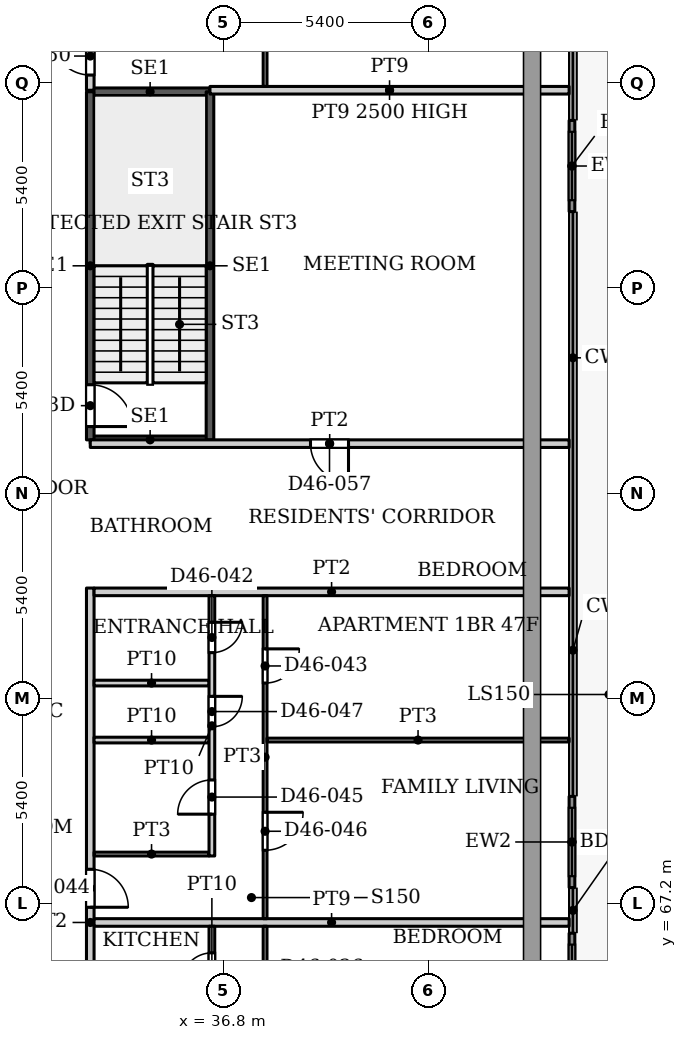
"""IFC4 building model, lengths in metres.
Left out: names, types, materials, properties, quantities, classifications, styles, units other than length and angle.
Written with IfcOpenShell. Run it as: python <this file> out.ifc"""

import sys

from ifc_helpers import new_model, si_unit, direction, frame, frame_2d, origin, place, context, subcontext, project, spatial, rectangle, extrude, source, transform, mapped, element, fill, save


model = new_model("IFC4")
c1 = context("Model", 3, precision=1e-05, world=origin(), true_north=direction((0.0, 1.0)))
c2 = subcontext(c1, "Body", "Model", "MODEL_VIEW")
j1 = project(units=[si_unit("LENGTHUNIT", "METRE"), si_unit("PLANEANGLEUNIT", "RADIAN")], contexts=[c1])
p1 = place(None, origin())
s1 = spatial("IfcSite", under=j1, at=p1, CompositionType="ELEMENT")
p2 = place(p1, origin())
s2 = spatial("IfcBuilding", under=s1, at=p2, CompositionType="ELEMENT")
p3 = place(p2, frame((0.0, 0.0, 199.4)))
s3 = spatial("IfcBuildingStorey", under=s2, at=p3, CompositionType="ELEMENT", Elevation=199.4)
p4 = place(p3, frame((45.975, 87.806, 0.0), z_axis=(0.0, 0.0, 1.0), x_axis=(0.0, -1.0, 0.0)))
e1 = element("IfcWall", 1, at=p4, inside=s3, PredefinedType="SOLIDWALL", context=c2, shape_type="SweptSolid", body=[
    extrude(rectangle(XDim=2.4, YDim=0.15, at=frame_2d((1.2, 0.0))), origin(), (0.0, 0.0, 1.0), 3.75),
])
p5 = place(p4, frame((0.3, 0.0, 0.0)))
e2 = element("IfcOpeningElement", 2, at=p5, cuts=e1, PredefinedType="OPENING", context=c2, shape_type="SweptSolid", body=[
    extrude(rectangle(XDim=1.8, YDim=2.4, at=frame_2d((0.9, 1.2))), frame((0.0, 0.085, 0.0), z_axis=(0.0, -1.0, 0.0), x_axis=(1.0, 0.0, 0.0)), (0.0, 0.0, 1.0), 0.17),
])
p6 = place(p3, frame((45.975, 70.018, 0.0), z_axis=(0.0, 0.0, 1.0), x_axis=(0.0, -1.0, 0.0)))
e3 = element("IfcWall", 3, at=p6, inside=s3, PredefinedType="SOLIDWALL", context=c2, shape_type="SweptSolid", body=[
    extrude(rectangle(XDim=2.4, YDim=0.15, at=frame_2d((1.2, 0.0))), origin(), (0.0, 0.0, 1.0), 3.75),
])
p7 = place(p6, frame((0.3, 0.0, 0.0)))
e4 = element("IfcOpeningElement", 4, at=p7, cuts=e3, PredefinedType="OPENING", context=c2, shape_type="SweptSolid", body=[
    extrude(rectangle(XDim=1.8, YDim=2.4, at=frame_2d((0.9, 1.2))), frame((0.0, 0.085, 0.0), z_axis=(0.0, -1.0, 0.0), x_axis=(1.0, 0.0, 0.0)), (0.0, 0.0, 1.0), 0.17),
])
p8 = place(p3, frame((45.975, 66.418, 0.0), z_axis=(0.0, 0.0, 1.0), x_axis=(0.0, -1.0, 0.0)))
e5 = element("IfcWall", 5, at=p8, inside=s3, PredefinedType="SOLIDWALL", context=c2, shape_type="SweptSolid", body=[
    extrude(rectangle(XDim=2.4, YDim=0.15, at=frame_2d((1.2, 0.0))), origin(), (0.0, 0.0, 1.0), 3.75),
])
p9 = place(p8, frame((0.3, 0.0, 0.0)))
e6 = element("IfcOpeningElement", 6, at=p9, cuts=e5, PredefinedType="OPENING", context=c2, shape_type="SweptSolid", body=[
    extrude(rectangle(XDim=1.8, YDim=2.4, at=frame_2d((0.9, 1.2))), frame((0.0, 0.085, 0.0), z_axis=(0.0, -1.0, 0.0), x_axis=(1.0, 0.0, 0.0)), (0.0, 0.0, 1.0), 0.17),
])
for number, where, z_axis, x_axis in (
    (7, (33.3, 79.4, 0.0), (0.0, 0.0, 1.0), (1.0, 0.0, 0.0)),
    (8, (33.3, 88.56, 0.0), (0.0, 0.0, 1.0), (1.0, 0.0, 0.0)),
):
    element("IfcWall", number, at=place(p3, frame(where, z_axis=z_axis, x_axis=x_axis)), inside=s3, PredefinedType="SHEAR", context=c2, shape_type="SweptSolid", body=[
        extrude(rectangle(XDim=3.15, YDim=0.2, at=frame_2d((1.575, 0.0))), origin(), (0.0, 0.0, 1.0), 3.9),
    ])
p10 = place(p3, frame((33.3, 79.4, 0.0), z_axis=(0.0, 0.0, 1.0), x_axis=(0.0, 1.0, 0.0)))
e9 = element("IfcWall", 9, at=p10, inside=s3, PredefinedType="SHEAR", context=c2, shape_type="SweptSolid", body=[
    extrude(rectangle(XDim=9.16, YDim=0.2, at=frame_2d((4.58, 0.0))), origin(), (0.0, 0.0, 1.0), 3.9),
])
p11 = place(p10, frame((0.35, 0.0, 0.0)))
e10 = element("IfcOpeningElement", 10, at=p11, cuts=e9, PredefinedType="OPENING", context=c2, shape_type="SweptSolid", body=[
    extrude(rectangle(XDim=1.1, YDim=2.2, at=frame_2d((0.55, 1.1))), frame((0.0, 0.11, 0.0), z_axis=(0.0, -1.0, 0.0), x_axis=(1.0, 0.0, 0.0)), (0.0, 0.0, 1.0), 0.22),
])
p12 = place(p3, frame((36.45, 79.4, 0.0), z_axis=(0.0, 0.0, 1.0), x_axis=(0.0, 1.0, 0.0)))
e11 = element("IfcWall", 11, at=p12, inside=s3, PredefinedType="SHEAR", context=c2, shape_type="SweptSolid", body=[
    extrude(rectangle(XDim=9.16, YDim=0.2, at=frame_2d((4.58, 0.0))), origin(), (0.0, 0.0, 1.0), 3.9),
])
p13 = place(p3, frame((33.3, 57.9, 0.0), z_axis=(0.0, 0.0, 1.0), x_axis=(0.0, 1.0, 0.0)))
e12 = element("IfcWall", 12, at=p13, inside=s3, PredefinedType="PARTITIONING", context=c2, shape_type="SweptSolid", body=[
    extrude(rectangle(XDim=17.6, YDim=0.2, at=frame_2d((8.8, 0.0))), origin(), (0.0, 0.0, 1.0), 3.6),
])
p14 = place(p13, frame((5.0, 0.0, 0.0)))
e13 = element("IfcOpeningElement", 13, at=p14, cuts=e12, PredefinedType="OPENING", context=c2, shape_type="SweptSolid", body=[
    extrude(rectangle(XDim=1.0, YDim=2.1, at=frame_2d((0.5, 1.05))), frame((0.0, 0.11, 0.0), z_axis=(0.0, -1.0, 0.0), x_axis=(1.0, 0.0, 0.0)), (0.0, 0.0, 1.0), 0.22),
])
p15 = place(p13, frame((9.2, 0.0, 0.0)))
e14 = element("IfcOpeningElement", 14, at=p15, cuts=e12, PredefinedType="OPENING", context=c2, shape_type="SweptSolid", body=[
    extrude(rectangle(XDim=1.0, YDim=2.1, at=frame_2d((0.5, 1.05))), frame((0.0, 0.11, 0.0), z_axis=(0.0, -1.0, 0.0), x_axis=(1.0, 0.0, 0.0)), (0.0, 0.0, 1.0), 0.22),
])
p16 = place(p3, frame((33.3, 79.3, 0.0), z_axis=(0.0, 0.0, 1.0), x_axis=(1.0, 0.0, 0.0)))
e15 = element("IfcWall", 15, at=p16, inside=s3, PredefinedType="PARTITIONING", context=c2, shape_type="SweptSolid", body=[
    extrude(rectangle(XDim=12.6, YDim=0.2, at=frame_2d((6.3, 0.0))), origin(), (0.0, 0.0, 1.0), 3.6),
])
p17 = place(p16, frame((5.795, 0.0, 0.0)))
e16 = element("IfcOpeningElement", 16, at=p17, cuts=e15, PredefinedType="OPENING", context=c2, shape_type="SweptSolid", body=[
    extrude(rectangle(XDim=1.0, YDim=2.1, at=frame_2d((0.5, 1.05))), frame((0.0, 0.11, 0.0), z_axis=(0.0, -1.0, 0.0), x_axis=(1.0, 0.0, 0.0)), (0.0, 0.0, 1.0), 0.22),
])
p18 = place(p3, frame((33.3, 88.6, 0.0), z_axis=(0.0, 0.0, 1.0), x_axis=(0.0, 1.0, 0.0)))
e17 = element("IfcWall", 17, at=p18, inside=s3, PredefinedType="PARTITIONING", context=c2, shape_type="SweptSolid", body=[
    extrude(rectangle(XDim=5.5, YDim=0.2, at=frame_2d((2.75, 0.0))), origin(), (0.0, 0.0, 1.0), 3.6),
])
p19 = place(p18, frame((0.4, 0.0, 0.0)))
e18 = element("IfcOpeningElement", 18, at=p19, cuts=e17, PredefinedType="OPENING", context=c2, shape_type="SweptSolid", body=[
    extrude(rectangle(XDim=1.0, YDim=2.1, at=frame_2d((0.5, 1.05))), frame((0.0, 0.11, 0.0), z_axis=(0.0, -1.0, 0.0), x_axis=(1.0, 0.0, 0.0)), (0.0, 0.0, 1.0), 0.22),
])
p20 = place(p3, frame((33.4, 66.7, 0.0), z_axis=(0.0, 0.0, 1.0), x_axis=(1.0, 0.0, 0.0)))
e19 = element("IfcWall", 19, at=p20, inside=s3, PredefinedType="PARTITIONING", context=c2, shape_type="SweptSolid", body=[
    extrude(rectangle(XDim=12.5, YDim=0.2, at=frame_2d((6.25, 0.0))), origin(), (0.0, 0.0, 1.0), 3.6),
])
p21 = place(p3, frame((33.4, 68.5, 0.0), z_axis=(0.0, 0.0, 1.0), x_axis=(1.0, 0.0, 0.0)))
e20 = element("IfcWall", 20, at=p21, inside=s3, PredefinedType="PARTITIONING", context=c2, shape_type="SweptSolid", body=[
    extrude(rectangle(XDim=3.025, YDim=0.1, at=frame_2d((1.513, 0.0))), origin(), (0.0, 0.0, 1.0), 3.6),
])
for number, where, z_axis, x_axis in (
    (21, (33.4, 71.5, 0.0), (0.0, 0.0, 1.0), (1.0, 0.0, 0.0)),
    (22, (33.4, 73.0, 0.0), (0.0, 0.0, 1.0), (1.0, 0.0, 0.0)),
):
    element("IfcWall", number, at=place(p3, frame(where, z_axis=z_axis, x_axis=x_axis)), inside=s3, PredefinedType="PARTITIONING", context=c2, shape_type="SweptSolid", body=[
        extrude(rectangle(XDim=3.025, YDim=0.15, at=frame_2d((1.513, 0.0))), origin(), (0.0, 0.0, 1.0), 3.6),
    ])
p22 = place(p3, frame((33.4, 75.4, 0.0), z_axis=(0.0, 0.0, 1.0), x_axis=(1.0, 0.0, 0.0)))
e23 = element("IfcWall", 23, at=p22, inside=s3, PredefinedType="PARTITIONING", context=c2, shape_type="SweptSolid", body=[
    extrude(rectangle(XDim=12.5, YDim=0.2, at=frame_2d((6.25, 0.0))), origin(), (0.0, 0.0, 1.0), 3.6),
])
p23 = place(p3, frame((36.5, 64.375, 0.0), z_axis=(0.0, 0.0, 1.0), x_axis=(0.0, 1.0, 0.0)))
e24 = element("IfcWall", 24, at=p23, inside=s3, PredefinedType="PARTITIONING", context=c2, shape_type="SweptSolid", body=[
    extrude(rectangle(XDim=2.225, YDim=0.15, at=frame_2d((1.113, 0.0))), origin(), (0.0, 0.0, 1.0), 3.6),
])
p24 = place(p23, frame((0.725, 0.0, 0.0)))
e25 = element("IfcOpeningElement", 25, at=p24, cuts=e24, PredefinedType="OPENING", context=c2, shape_type="SweptSolid", body=[
    extrude(rectangle(XDim=0.8, YDim=2.1, at=frame_2d((0.4, 1.05))), frame((0.0, 0.085, 0.0), z_axis=(0.0, -1.0, 0.0), x_axis=(1.0, 0.0, 0.0)), (0.0, 0.0, 1.0), 0.17),
])
p25 = place(p3, frame((36.5, 68.45, 0.0), z_axis=(0.0, 0.0, 1.0), x_axis=(0.0, 1.0, 0.0)))
e26 = element("IfcWall", 26, at=p25, inside=s3, PredefinedType="PARTITIONING", context=c2, shape_type="SweptSolid", body=[
    extrude(rectangle(XDim=6.85, YDim=0.15, at=frame_2d((3.425, 0.0))), origin(), (0.0, 0.0, 1.0), 3.6),
])
p26 = place(p25, frame((5.35, 0.0, 0.0)))
e27 = element("IfcOpeningElement", 27, at=p26, cuts=e26, PredefinedType="OPENING", context=c2, shape_type="SweptSolid", body=[
    extrude(rectangle(XDim=0.8, YDim=2.1, at=frame_2d((0.4, 1.05))), frame((0.0, 0.085, 0.0), z_axis=(0.0, -1.0, 0.0), x_axis=(1.0, 0.0, 0.0)), (0.0, 0.0, 1.0), 0.17),
])
p27 = place(p25, frame((1.1, 0.0, 0.0)))
e28 = element("IfcOpeningElement", 28, at=p27, cuts=e26, PredefinedType="OPENING", context=c2, shape_type="SweptSolid", body=[
    extrude(rectangle(XDim=0.9, YDim=2.1, at=frame_2d((0.45, 1.05))), frame((0.0, 0.085, 0.0), z_axis=(0.0, -1.0, 0.0), x_axis=(1.0, 0.0, 0.0)), (0.0, 0.0, 1.0), 0.17),
])
p28 = place(p25, frame((3.4, 0.0, 0.0)))
e29 = element("IfcOpeningElement", 29, at=p28, cuts=e26, PredefinedType="OPENING", context=c2, shape_type="SweptSolid", body=[
    extrude(rectangle(XDim=0.8, YDim=2.1, at=frame_2d((0.4, 1.05))), frame((0.0, 0.085, 0.0), z_axis=(0.0, -1.0, 0.0), x_axis=(1.0, 0.0, 0.0)), (0.0, 0.0, 1.0), 0.17),
])
p29 = place(p3, frame((36.45, 88.6, 0.0), z_axis=(0.0, 0.0, 1.0), x_axis=(1.0, 0.0, 0.0)))
e30 = element("IfcWall", 30, at=p29, inside=s3, PredefinedType="PARTITIONING", context=c2, shape_type="SweptSolid", body=[
    extrude(rectangle(XDim=9.45, YDim=0.2, at=frame_2d((4.725, 0.0))), origin(), (0.0, 0.0, 1.0), 2.5),
])
p30 = place(p3, frame((37.9, 58.1, 0.0), z_axis=(0.0, 0.0, 1.0), x_axis=(0.0, 1.0, 0.0)))
e31 = element("IfcWall", 31, at=p30, inside=s3, PredefinedType="PARTITIONING", context=c2, shape_type="SweptSolid", body=[
    extrude(rectangle(XDim=8.5, YDim=0.1, at=frame_2d((4.25, 0.0))), origin(), (0.0, 0.0, 1.0), 3.6),
])
p31 = place(p30, frame((6.35, 0.0, 0.0)))
e32 = element("IfcOpeningElement", 32, at=p31, cuts=e31, PredefinedType="OPENING", context=c2, shape_type="SweptSolid", body=[
    extrude(rectangle(XDim=0.9, YDim=2.1, at=frame_2d((0.45, 1.05))), frame((0.0, 0.06, 0.0), z_axis=(0.0, -1.0, 0.0), x_axis=(1.0, 0.0, 0.0)), (0.0, 0.0, 1.0), 0.12),
])
p32 = place(p30, frame((1.95, 0.0, 0.0)))
e33 = element("IfcOpeningElement", 33, at=p32, cuts=e31, PredefinedType="OPENING", context=c2, shape_type="SweptSolid", body=[
    extrude(rectangle(XDim=1.0, YDim=2.1, at=frame_2d((0.5, 1.05))), frame((0.0, 0.06, 0.0), z_axis=(0.0, -1.0, 0.0), x_axis=(1.0, 0.0, 0.0)), (0.0, 0.0, 1.0), 0.12),
])
p33 = place(p3, frame((37.9, 66.8, 0.0), z_axis=(0.0, 0.0, 1.0), x_axis=(0.0, 1.0, 0.0)))
e34 = element("IfcWall", 34, at=p33, inside=s3, PredefinedType="PARTITIONING", context=c2, shape_type="SweptSolid", body=[
    extrude(rectangle(XDim=8.5, YDim=0.1, at=frame_2d((4.25, 0.0))), origin(), (0.0, 0.0, 1.0), 3.6),
])
p34 = place(p33, frame((6.2, 0.0, 0.0)))
e35 = element("IfcOpeningElement", 35, at=p34, cuts=e34, PredefinedType="OPENING", context=c2, shape_type="SweptSolid", body=[
    extrude(rectangle(XDim=0.9, YDim=2.1, at=frame_2d((0.45, 1.05))), frame((0.0, 0.06, 0.0), z_axis=(0.0, -1.0, 0.0), x_axis=(1.0, 0.0, 0.0)), (0.0, 0.0, 1.0), 0.12),
])
p35 = place(p33, frame((1.8, 0.0, 0.0)))
e36 = element("IfcOpeningElement", 36, at=p35, cuts=e34, PredefinedType="OPENING", context=c2, shape_type="SweptSolid", body=[
    extrude(rectangle(XDim=1.0, YDim=2.1, at=frame_2d((0.5, 1.05))), frame((0.0, 0.06, 0.0), z_axis=(0.0, -1.0, 0.0), x_axis=(1.0, 0.0, 0.0)), (0.0, 0.0, 1.0), 0.12),
])
p36 = place(p3, frame((37.9, 88.7, 0.0), z_axis=(0.0, 0.0, 1.0), x_axis=(0.0, 1.0, 0.0)))
e37 = element("IfcWall", 37, at=p36, inside=s3, PredefinedType="PARTITIONING", context=c2, shape_type="SweptSolid", body=[
    extrude(rectangle(XDim=9.2, YDim=0.1, at=frame_2d((4.6, 0.0))), origin(), (0.0, 0.0, 1.0), 3.6),
])
p37 = place(p36, frame((6.95, 0.0, 0.0)))
e38 = element("IfcOpeningElement", 38, at=p37, cuts=e37, PredefinedType="OPENING", context=c2, shape_type="SweptSolid", body=[
    extrude(rectangle(XDim=0.9, YDim=2.1, at=frame_2d((0.45, 1.05))), frame((0.0, 0.06, 0.0), z_axis=(0.0, -1.0, 0.0), x_axis=(1.0, 0.0, 0.0)), (0.0, 0.0, 1.0), 0.12),
])
p38 = place(p36, frame((2.25, 0.0, 0.0)))
e39 = element("IfcOpeningElement", 39, at=p38, cuts=e37, PredefinedType="OPENING", context=c2, shape_type="SweptSolid", body=[
    extrude(rectangle(XDim=1.0, YDim=2.1, at=frame_2d((0.5, 1.05))), frame((0.0, 0.06, 0.0), z_axis=(0.0, -1.0, 0.0), x_axis=(1.0, 0.0, 0.0)), (0.0, 0.0, 1.0), 0.12),
])
p39 = place(p3, frame((37.95, 71.5, 0.0), z_axis=(0.0, 0.0, 1.0), x_axis=(1.0, 0.0, 0.0)))
e40 = element("IfcWall", 40, at=p39, inside=s3, PredefinedType="PARTITIONING", context=c2, shape_type="SweptSolid", body=[
    extrude(rectangle(XDim=7.95, YDim=0.1, at=frame_2d((3.975, 0.0))), origin(), (0.0, 0.0, 1.0), 3.6),
])
m1 = source(origin(), c2, "Body", "SweptSolid", [
    extrude(rectangle(XDim=1.8, YDim=2.4, at=frame_2d((0.9, 1.2))), frame((0.0, 0.025, 0.0), z_axis=(0.0, -1.0, 0.0), x_axis=(1.0, 0.0, 0.0)), (0.0, 0.0, 1.0), 0.05),
])
p40 = place(p5, origin())
e41 = element("IfcDoor", 41, at=p40, inside=s3, OperationType="SLIDING_TO_LEFT", PredefinedType="DOOR", context=c2, shape_type="MappedRepresentation", body=[
    mapped(m1, transform((0.0, 0.0, 0.0), x_axis=(1.0, 0.0, 0.0), y_axis=(0.0, 1.0, 0.0), z_axis=(0.0, 0.0, 1.0), scale=1.0)),
])
fill(e2, e41)
p41 = place(p7, origin())
e42 = element("IfcDoor", 42, at=p41, inside=s3, OperationType="SLIDING_TO_LEFT", PredefinedType="DOOR", context=c2, shape_type="MappedRepresentation", body=[
    mapped(m1, transform((0.0, 0.0, 0.0), x_axis=(1.0, 0.0, 0.0), y_axis=(0.0, 1.0, 0.0), z_axis=(0.0, 0.0, 1.0), scale=1.0)),
])
fill(e4, e42)
p42 = place(p9, origin())
e43 = element("IfcDoor", 43, at=p42, inside=s3, OperationType="SLIDING_TO_LEFT", PredefinedType="DOOR", context=c2, shape_type="MappedRepresentation", body=[
    mapped(m1, transform((0.0, 0.0, 0.0), x_axis=(1.0, 0.0, 0.0), y_axis=(0.0, 1.0, 0.0), z_axis=(0.0, 0.0, 1.0), scale=1.0)),
])
fill(e6, e43)
m2 = source(origin(), c2, "Body", "SweptSolid", [
    extrude(rectangle(XDim=1.1, YDim=2.2, at=frame_2d((0.55, 1.1))), frame((0.0, 0.025, 0.0), z_axis=(0.0, -1.0, 0.0), x_axis=(1.0, 0.0, 0.0)), (0.0, 0.0, 1.0), 0.05),
])
p43 = place(p11, origin())
e44 = element("IfcDoor", 44, at=p43, inside=s3, OperationType="SINGLE_SWING_RIGHT", PredefinedType="DOOR", context=c2, shape_type="MappedRepresentation", body=[
    mapped(m2, transform((0.0, 0.0, 0.0), x_axis=(1.0, 0.0, 0.0), y_axis=(0.0, 1.0, 0.0), z_axis=(0.0, 0.0, 1.0), scale=1.0)),
])
fill(e10, e44)
m3 = source(origin(), c2, "Body", "SweptSolid", [
    extrude(rectangle(XDim=0.8, YDim=2.1, at=frame_2d((0.4, 1.05))), frame((0.0, 0.025, 0.0), z_axis=(0.0, -1.0, 0.0), x_axis=(1.0, 0.0, 0.0)), (0.0, 0.0, 1.0), 0.05),
])
p44 = place(p24, origin())
e45 = element("IfcDoor", 45, at=p44, inside=s3, OperationType="SINGLE_SWING_LEFT", PredefinedType="DOOR", context=c2, shape_type="MappedRepresentation", body=[
    mapped(m3, transform((0.0, 0.0, 0.0), x_axis=(1.0, 0.0, 0.0), y_axis=(0.0, 1.0, 0.0), z_axis=(0.0, 0.0, 1.0), scale=1.0)),
])
fill(e25, e45)
p45 = place(p26, origin())
e46 = element("IfcDoor", 46, at=p45, inside=s3, OperationType="SINGLE_SWING_RIGHT", PredefinedType="DOOR", context=c2, shape_type="MappedRepresentation", body=[
    mapped(m3, transform((0.0, 0.0, 0.0), x_axis=(1.0, 0.0, 0.0), y_axis=(0.0, 1.0, 0.0), z_axis=(0.0, 0.0, 1.0), scale=1.0)),
])
fill(e27, e46)
m4 = source(origin(), c2, "Body", "SweptSolid", [
    extrude(rectangle(XDim=0.9, YDim=2.1, at=frame_2d((0.45, 1.05))), frame((0.0, 0.025, 0.0), z_axis=(0.0, -1.0, 0.0), x_axis=(1.0, 0.0, 0.0)), (0.0, 0.0, 1.0), 0.05),
])
p46 = place(p34, origin())
e47 = element("IfcDoor", 47, at=p46, inside=s3, OperationType="SINGLE_SWING_RIGHT", PredefinedType="DOOR", context=c2, shape_type="MappedRepresentation", body=[
    mapped(m4, transform((0.0, 0.0, 0.0), x_axis=(1.0, 0.0, 0.0), y_axis=(0.0, 1.0, 0.0), z_axis=(0.0, 0.0, 1.0), scale=1.0)),
])
fill(e35, e47)
m5 = source(origin(), c2, "Body", "SweptSolid", [
    extrude(rectangle(XDim=1.0, YDim=2.1, at=frame_2d((0.5, 1.05))), frame((0.0, 0.025, 0.0), z_axis=(0.0, -1.0, 0.0), x_axis=(1.0, 0.0, 0.0)), (0.0, 0.0, 1.0), 0.05),
])
p47 = place(p15, origin())
e48 = element("IfcDoor", 48, at=p47, inside=s3, OperationType="SINGLE_SWING_RIGHT", PredefinedType="DOOR", context=c2, shape_type="MappedRepresentation", body=[
    mapped(m5, transform((0.0, 0.0, 0.0), x_axis=(1.0, 0.0, 0.0), y_axis=(0.0, 1.0, 0.0), z_axis=(0.0, 0.0, 1.0), scale=1.0)),
])
fill(e14, e48)
p48 = place(p27, origin())
e49 = element("IfcDoor", 49, at=p48, inside=s3, OperationType="SINGLE_SWING_LEFT", PredefinedType="DOOR", context=c2, shape_type="MappedRepresentation", body=[
    mapped(m4, transform((0.0, 0.0, 0.0), x_axis=(1.0, 0.0, 0.0), y_axis=(0.0, 1.0, 0.0), z_axis=(0.0, 0.0, 1.0), scale=1.0)),
])
fill(e28, e49)
m6 = source(origin(), c2, "Body", "SweptSolid", [
    extrude(rectangle(XDim=1.0, YDim=2.1, at=frame_2d((0.5, 1.05))), frame((0.0, 0.025, 0.0), z_axis=(0.0, -1.0, 0.0), x_axis=(1.0, 0.0, 0.0)), (0.0, 0.0, 1.0), 0.05),
])
p49 = place(p35, origin())
e50 = element("IfcDoor", 50, at=p49, inside=s3, OperationType="SINGLE_SWING_RIGHT", PredefinedType="DOOR", context=c2, shape_type="MappedRepresentation", body=[
    mapped(m6, transform((0.0, 0.0, 0.0), x_axis=(1.0, 0.0, 0.0), y_axis=(0.0, 1.0, 0.0), z_axis=(0.0, 0.0, 1.0), scale=1.0)),
])
fill(e36, e50)
p50 = place(p28, origin())
e51 = element("IfcDoor", 51, at=p50, inside=s3, OperationType="SINGLE_SWING_RIGHT", PredefinedType="DOOR", context=c2, shape_type="MappedRepresentation", body=[
    mapped(m3, transform((0.0, 0.0, 0.0), x_axis=(1.0, 0.0, 0.0), y_axis=(0.0, 1.0, 0.0), z_axis=(0.0, 0.0, 1.0), scale=1.0)),
])
fill(e29, e51)
p51 = place(p19, origin())
e52 = element("IfcDoor", 52, at=p51, inside=s3, OperationType="SINGLE_SWING_LEFT", PredefinedType="DOOR", context=c2, shape_type="MappedRepresentation", body=[
    mapped(m5, transform((0.0, 0.0, 0.0), x_axis=(1.0, 0.0, 0.0), y_axis=(0.0, 1.0, 0.0), z_axis=(0.0, 0.0, 1.0), scale=1.0)),
])
fill(e18, e52)
m7 = source(origin(), c2, "Body", "SweptSolid", [
    extrude(rectangle(XDim=1.0, YDim=2.1, at=frame_2d((0.5, 1.05))), frame((0.0, 0.025, 0.0), z_axis=(0.0, -1.0, 0.0), x_axis=(1.0, 0.0, 0.0)), (0.0, 0.0, 1.0), 0.05),
])
p52 = place(p17, origin())
e53 = element("IfcDoor", 53, at=p52, inside=s3, OperationType="SINGLE_SWING_RIGHT", PredefinedType="DOOR", context=c2, shape_type="MappedRepresentation", body=[
    mapped(m7, transform((0.0, 0.0, 0.0), x_axis=(1.0, 0.0, 0.0), y_axis=(0.0, 1.0, 0.0), z_axis=(0.0, 0.0, 1.0), scale=1.0)),
])
fill(e16, e53)
save(model, sys.argv[1])
